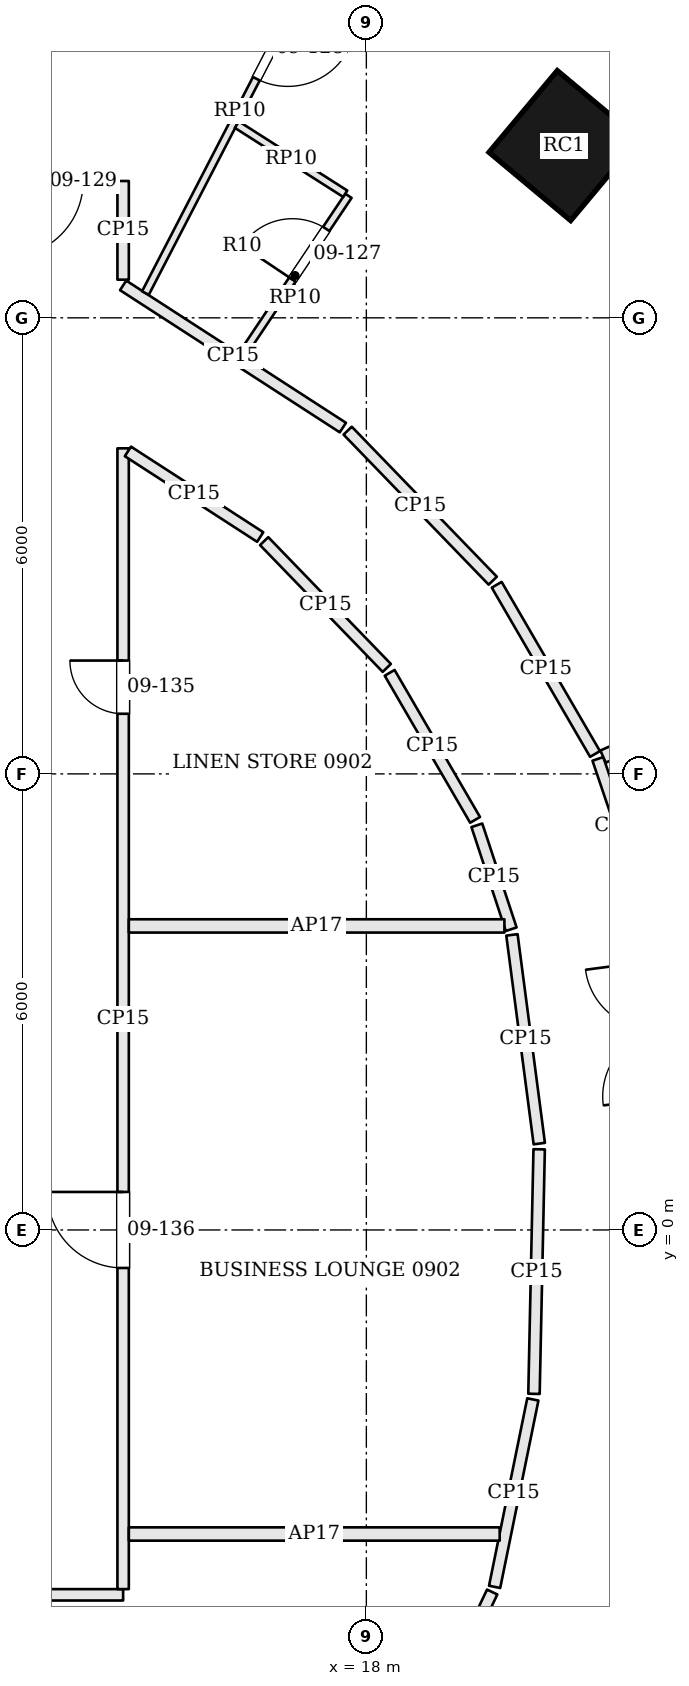
"""IFC4 building model, lengths in metres.
Left out: names, types, materials, properties, quantities, classifications, styles, units other than length and angle.
Written with IfcOpenShell. Run it as: python <this file> out.ifc"""

import sys

from ifc_helpers import new_model, si_unit, direction, frame, frame_2d, origin, origin_2d, place, context, subcontext, project, spatial, rectangle, extrude, element, fill, save


model = new_model("IFC4")
c1 = context("Model", 3, precision=1e-05, world=origin(), true_north=direction((0.0, 1.0)))
c2 = subcontext(c1, "Body", "Model", "MODEL_VIEW")
j1 = project(units=[si_unit("LENGTHUNIT", "METRE"), si_unit("PLANEANGLEUNIT", "RADIAN")], contexts=[c1])
p1 = place(None, origin())
s1 = spatial("IfcSite", under=j1, at=p1, CompositionType="ELEMENT")
p2 = place(p1, origin())
s2 = spatial("IfcBuilding", under=s1, at=p2, CompositionType="ELEMENT")
p3 = place(p2, frame((0.0, 0.0, 48.3)))
s3 = spatial("IfcBuildingStorey", under=s2, at=p3, CompositionType="ELEMENT", Elevation=48.3)
p4 = place(p3, frame((20.6, 14.266, 0.0), z_axis=(0.0, 0.0, 1.0), x_axis=(-0.767209547574, 0.641396531104, 0.0)))
e1 = element("IfcColumn", 1, at=p4, inside=s3, PredefinedType="COLUMN", context=c2, shape_type="SweptSolid", body=[
    extrude(rectangle(XDim=1.4, YDim=1.4, at=origin_2d()), origin(), (0.0, 0.0, 1.0), 3.6),
])
p5 = place(p3, frame((14.014, 19.447, 0.0), z_axis=(0.0, 0.0, 1.0), x_axis=(-0.318853578383, -0.947803985828, 0.0)))
e2 = element("IfcWall", 2, at=p5, inside=s3, PredefinedType="PARTITIONING", context=c2, shape_type="SweptSolid", body=[
    extrude(rectangle(XDim=5.883, YDim=0.175, at=frame_2d((2.941, 0.0))), origin(), (0.0, 0.0, 1.0), 2.68),
])
p6 = place(p3, frame((21.644, 4.43, 0.0), z_axis=(0.0, 0.0, 1.0), x_axis=(-0.320738869387, 0.9471676608, 0.0)))
e3 = element("IfcWall", 3, at=p6, inside=s3, PredefinedType="PARTITIONING", context=c2, shape_type="SweptSolid", body=[
    extrude(rectangle(XDim=1.866, YDim=0.15, at=frame_2d((0.933, 0.0))), origin(), (0.0, 0.0, 1.0), 2.68),
])
p7 = place(p3, frame((28.213, 9.371, 0.0), z_axis=(0.0, 0.0, 1.0), x_axis=(-0.914345064768, -0.404935923986, 0.0)))
e4 = element("IfcWall", 4, at=p7, inside=s3, PredefinedType="PARTITIONING", context=c2, shape_type="SweptSolid", body=[
    extrude(rectangle(XDim=7.763, YDim=0.175, at=frame_2d((3.882, 0.0))), origin(), (0.0, 0.0, 1.0), 2.68),
])
p8 = place(p3, frame((21.008, 6.262, 0.0), z_axis=(0.0, 0.0, 1.0), x_axis=(-0.502366583903, 0.864654737671, 0.0)))
e5 = element("IfcWall", 5, at=p8, inside=s3, PredefinedType="PARTITIONING", context=c2, shape_type="SweptSolid", body=[
    extrude(rectangle(XDim=2.574, YDim=0.15, at=frame_2d((1.287, 0.0))), origin(), (0.0, 0.0, 1.0), 2.68),
])
p9 = place(p3, frame((19.663, 8.542, 0.0), z_axis=(0.0, 0.0, 1.0), x_axis=(-0.695225869021, 0.718791340407, 0.0)))
e6 = element("IfcWall", 6, at=p9, inside=s3, PredefinedType="PARTITIONING", context=c2, shape_type="SweptSolid", body=[
    extrude(rectangle(XDim=2.745, YDim=0.15, at=frame_2d((1.373, 0.0))), origin(), (0.0, 0.0, 1.0), 2.68),
])
p10 = place(p3, frame((17.691, 10.556, 0.0), z_axis=(0.0, 0.0, 1.0), x_axis=(-0.839564450265, 0.54326009779, 0.0)))
e7 = element("IfcWall", 7, at=p10, inside=s3, PredefinedType="PARTITIONING", context=c2, shape_type="SweptSolid", body=[
    extrude(rectangle(XDim=3.443, YDim=0.15, at=frame_2d((1.722, 0.0))), origin(), (0.0, 0.0, 1.0), 2.68),
])
p11 = place(p3, frame((14.8, 12.502, 0.0), z_axis=(0.0, 0.0, 1.0), x_axis=(-0.000188040613, 0.99999998232, 0.0)))
e8 = element("IfcWall", 8, at=p11, inside=s3, PredefinedType="PARTITIONING", context=c2, shape_type="SweptSolid", body=[
    extrude(rectangle(XDim=1.298, YDim=0.15, at=frame_2d((0.649, 0.0))), origin(), (0.0, 0.0, 1.0), 2.68),
])
p12 = place(p3, frame((14.725, 13.8, 0.0), z_axis=(0.0, 0.0, 1.0), x_axis=(-1.0, 0.0, 0.0)))
e9 = element("IfcWall", 9, at=p12, inside=s3, PredefinedType="PARTITIONING", context=c2, shape_type="SweptSolid", body=[
    extrude(rectangle(XDim=2.535, YDim=0.15, at=frame_2d((1.268, 0.0))), origin(), (0.0, 0.0, 1.0), 2.68),
])
p13 = place(p12, frame((0.45, 0.0, 0.0)))
e10 = element("IfcOpeningElement", 10, at=p13, cuts=e9, PredefinedType="OPENING", context=c2, shape_type="SweptSolid", body=[
    extrude(rectangle(XDim=1.0, YDim=2.1, at=frame_2d((0.5, 1.05))), frame((0.0, 0.085, 0.0), z_axis=(0.0, -1.0, 0.0), x_axis=(1.0, 0.0, 0.0)), (0.0, 0.0, 1.0), 0.17),
])
p14 = place(p3, frame((-14.725, -4.8, 0.0), z_axis=(0.0, 0.0, 1.0), x_axis=(1.0, 0.0, 0.0)))
e11 = element("IfcWall", 11, at=p14, inside=s3, PredefinedType="PARTITIONING", context=c2, shape_type="SweptSolid", body=[
    extrude(rectangle(XDim=29.525, YDim=0.15, at=frame_2d((14.763, 0.0))), origin(), (0.0, 0.0, 1.0), 2.68),
])
p15 = place(p14, frame((2.075, 0.0, 0.0)))
e12 = element("IfcOpeningElement", 12, at=p15, cuts=e11, PredefinedType="OPENING", context=c2, shape_type="SweptSolid", body=[
    extrude(rectangle(XDim=1.0, YDim=2.4, at=frame_2d((0.5, 1.2))), frame((0.0, 0.085, 0.0), z_axis=(0.0, -1.0, 0.0), x_axis=(1.0, 0.0, 0.0)), (0.0, 0.0, 1.0), 0.17),
])
p16 = place(p14, frame((13.825, 0.0, 0.0)))
e13 = element("IfcOpeningElement", 13, at=p16, cuts=e11, PredefinedType="OPENING", context=c2, shape_type="SweptSolid", body=[
    extrude(rectangle(XDim=1.8, YDim=2.1, at=frame_2d((0.9, 1.05))), frame((0.0, 0.085, 0.0), z_axis=(0.0, -1.0, 0.0), x_axis=(1.0, 0.0, 0.0)), (0.0, 0.0, 1.0), 0.17),
])
p17 = place(p14, frame((26.375, 0.0, 0.0)))
e14 = element("IfcOpeningElement", 14, at=p17, cuts=e11, PredefinedType="OPENING", context=c2, shape_type="SweptSolid", body=[
    extrude(rectangle(XDim=1.0, YDim=2.4, at=frame_2d((0.5, 1.2))), frame((0.0, 0.085, 0.0), z_axis=(0.0, -1.0, 0.0), x_axis=(1.0, 0.0, 0.0)), (0.0, 0.0, 1.0), 0.17),
])
p18 = place(p3, frame((14.8, -4.725, 0.0), z_axis=(0.0, 0.0, 1.0), x_axis=(0.0, 1.0, 0.0)))
e15 = element("IfcWall", 15, at=p18, inside=s3, PredefinedType="PARTITIONING", context=c2, shape_type="SweptSolid", body=[
    extrude(rectangle(XDim=15.008, YDim=0.15, at=frame_2d((7.504, 0.0))), origin(), (0.0, 0.0, 1.0), 2.68),
])
p19 = place(p18, frame((11.516, 0.0, 0.0)))
e16 = element("IfcOpeningElement", 16, at=p19, cuts=e15, PredefinedType="OPENING", context=c2, shape_type="SweptSolid", body=[
    extrude(rectangle(XDim=0.7, YDim=2.1, at=frame_2d((0.35, 1.05))), frame((0.0, 0.085, 0.0), z_axis=(0.0, -1.0, 0.0), x_axis=(1.0, 0.0, 0.0)), (0.0, 0.0, 1.0), 0.17),
])
p20 = place(p18, frame((4.225, 0.0, 0.0)))
e17 = element("IfcOpeningElement", 17, at=p20, cuts=e15, PredefinedType="OPENING", context=c2, shape_type="SweptSolid", body=[
    extrude(rectangle(XDim=1.0, YDim=2.1, at=frame_2d((0.5, 1.05))), frame((0.0, 0.085, 0.0), z_axis=(0.0, -1.0, 0.0), x_axis=(1.0, 0.0, 0.0)), (0.0, 0.0, 1.0), 0.17),
])
p21 = place(p3, frame((14.863, 10.242, 0.0), z_axis=(0.0, 0.0, 1.0), x_axis=(0.839563837869, -0.543261044198, 0.0)))
e18 = element("IfcWall", 18, at=p21, inside=s3, PredefinedType="PARTITIONING", context=c2, shape_type="SweptSolid", body=[
    extrude(rectangle(XDim=2.073, YDim=0.15, at=frame_2d((1.037, 0.0))), origin(), (0.0, 0.0, 1.0), 2.68),
])
p22 = place(p3, frame((16.656, 9.062, 0.0), z_axis=(0.0, 0.0, 1.0), x_axis=(0.695225115827, -0.718792068906, 0.0)))
e19 = element("IfcWall", 19, at=p22, inside=s3, PredefinedType="PARTITIONING", context=c2, shape_type="SweptSolid", body=[
    extrude(rectangle(XDim=2.321, YDim=0.15, at=frame_2d((1.16, 0.0))), origin(), (0.0, 0.0, 1.0), 2.68),
])
p23 = place(p3, frame((18.306, 7.329, 0.0), z_axis=(0.0, 0.0, 1.0), x_axis=(0.502425081691, -0.864620747662, 0.0)))
e20 = element("IfcWall", 20, at=p23, inside=s3, PredefinedType="PARTITIONING", context=c2, shape_type="SweptSolid", body=[
    extrude(rectangle(XDim=2.237, YDim=0.15, at=frame_2d((1.119, 0.0))), origin(), (0.0, 0.0, 1.0), 2.68),
])
p24 = place(p3, frame((19.454, 5.324, 0.0), z_axis=(0.0, 0.0, 1.0), x_axis=(0.313632756375, -0.949544361327, 0.0)))
e21 = element("IfcWall", 21, at=p24, inside=s3, PredefinedType="PARTITIONING", context=c2, shape_type="SweptSolid", body=[
    extrude(rectangle(XDim=1.44, YDim=0.15, at=frame_2d((0.72, 0.0))), origin(), (0.0, 0.0, 1.0), 2.68),
])
p25 = place(p3, frame((19.915, 3.882, 0.0), z_axis=(0.0, 0.0, 1.0), x_axis=(0.129945947446, -0.991521079323, 0.0)))
e22 = element("IfcWall", 22, at=p25, inside=s3, PredefinedType="PARTITIONING", context=c2, shape_type="SweptSolid", body=[
    extrude(rectangle(XDim=2.769, YDim=0.15, at=frame_2d((1.385, 0.0))), origin(), (0.0, 0.0, 1.0), 2.68),
])
p26 = place(p3, frame((20.273, 1.061, 0.0), z_axis=(0.0, 0.0, 1.0), x_axis=(-0.021166906337, -0.99977595594, 0.0)))
e23 = element("IfcWall", 23, at=p26, inside=s3, PredefinedType="PARTITIONING", context=c2, shape_type="SweptSolid", body=[
    extrude(rectangle(XDim=3.218, YDim=0.15, at=frame_2d((1.609, 0.0))), origin(), (0.0, 0.0, 1.0), 2.68),
])
p27 = place(p3, frame((20.19, -2.229, 0.0), z_axis=(0.0, 0.0, 1.0), x_axis=(-0.199752828647, -0.97984631828, 0.0)))
e24 = element("IfcWall", 24, at=p27, inside=s3, PredefinedType="PARTITIONING", context=c2, shape_type="SweptSolid", body=[
    extrude(rectangle(XDim=2.517, YDim=0.15, at=frame_2d((1.258, 0.0))), origin(), (0.0, 0.0, 1.0), 2.68),
])
p28 = place(p3, frame((19.655, -4.763, 0.0), z_axis=(0.0, 0.0, 1.0), x_axis=(-0.427972604023, -0.903791707312, 0.0)))
e25 = element("IfcWall", 25, at=p28, inside=s3, PredefinedType="PARTITIONING", context=c2, shape_type="SweptSolid", body=[
    extrude(rectangle(XDim=2.215, YDim=0.15, at=frame_2d((1.107, 0.0))), origin(), (0.0, 0.0, 1.0), 2.68),
])
p29 = place(p3, frame((17.575, 17.118, 0.0), z_axis=(0.0, 0.0, 1.0), x_axis=(-0.459763790059, -0.88804124755, 0.0)))
e26 = element("IfcWall", 26, at=p29, inside=s3, PredefinedType="PARTITIONING", context=c2, shape_type="SweptSolid", body=[
    extrude(rectangle(XDim=5.397, YDim=0.1, at=frame_2d((2.698, 0.0))), origin(), (0.0, 0.0, 1.0), 2.934),
])
p30 = place(p29, frame((1.322, 0.0, 0.0)))
e27 = element("IfcOpeningElement", 27, at=p30, cuts=e26, PredefinedType="OPENING", context=c2, shape_type="SweptSolid", body=[
    extrude(rectangle(XDim=0.9, YDim=2.4, at=frame_2d((0.45, 1.2))), frame((0.0, 0.06, 0.0), z_axis=(0.0, -1.0, 0.0), x_axis=(1.0, 0.0, 0.0)), (0.0, 0.0, 1.0), 0.12),
])
p31 = place(p3, frame((16.36, 11.507, 0.0), z_axis=(0.0, 0.0, 1.0), x_axis=(0.556060542822, 0.831141788576, 0.0)))
e28 = element("IfcWall", 28, at=p31, inside=s3, PredefinedType="PARTITIONING", context=c2, shape_type="SweptSolid", body=[
    extrude(rectangle(XDim=2.525, YDim=0.1, at=frame_2d((1.262, 0.0))), origin(), (0.0, 0.0, 1.0), 2.934),
])
p32 = place(p31, frame((1.2, 0.0, 0.0)))
e29 = element("IfcOpeningElement", 29, at=p32, cuts=e28, PredefinedType="OPENING", context=c2, shape_type="SweptSolid", body=[
    extrude(rectangle(XDim=0.8, YDim=2.1, at=frame_2d((0.4, 1.05))), frame((0.0, 0.06, 0.0), z_axis=(0.0, -1.0, 0.0), x_axis=(1.0, 0.0, 0.0)), (0.0, 0.0, 1.0), 0.12),
])
p33 = place(p3, frame((17.722, 13.632, 0.0), z_axis=(0.0, 0.0, 1.0), x_axis=(-0.843078245163, 0.537790918977, 0.0)))
e30 = element("IfcWall", 30, at=p33, inside=s3, PredefinedType="PARTITIONING", context=c2, shape_type="SweptSolid", body=[
    extrude(rectangle(XDim=1.691, YDim=0.1, at=frame_2d((0.845, 0.0))), origin(), (0.0, 0.0, 1.0), 2.934),
])
p34 = place(p3, frame((14.875, 4.0, 0.0), z_axis=(0.0, 0.0, 1.0), x_axis=(1.0, 0.0, 0.0)))
e31 = element("IfcWall", 31, at=p34, inside=s3, PredefinedType="PARTITIONING", context=c2, shape_type="SweptSolid", body=[
    extrude(rectangle(XDim=4.941, YDim=0.175, at=frame_2d((2.471, 0.0))), origin(), (0.0, 0.0, 1.0), 2.68),
])
p35 = place(p3, frame((14.875, -4.0, 0.0), z_axis=(0.0, 0.0, 1.0), x_axis=(1.0, 0.0, 0.0)))
e32 = element("IfcWall", 32, at=p35, inside=s3, PredefinedType="PARTITIONING", context=c2, shape_type="SweptSolid", body=[
    extrude(rectangle(XDim=4.879, YDim=0.175, at=frame_2d((2.439, 0.0))), origin(), (0.0, 0.0, 1.0), 2.68),
])
p36 = place(p32, origin())
e33 = element("IfcDoor", 33, at=p36, inside=s3, OperationType="SINGLE_SWING_LEFT", PredefinedType="DOOR", context=c2, shape_type="SweptSolid", body=[
    extrude(rectangle(XDim=0.8, YDim=2.1, at=frame_2d((0.4, 1.05))), frame((0.0, 0.025, 0.0), z_axis=(0.0, -1.0, 0.0), x_axis=(1.0, 0.0, 0.0)), (0.0, 0.0, 1.0), 0.05),
])
fill(e29, e33)
p37 = place(p30, origin())
e34 = element("IfcDoor", 34, at=p37, inside=s3, OperationType="SINGLE_SWING_LEFT", PredefinedType="DOOR", context=c2, shape_type="SweptSolid", body=[
    extrude(rectangle(XDim=0.9, YDim=2.4, at=frame_2d((0.45, 1.2))), frame((0.0, 0.025, 0.0), z_axis=(0.0, -1.0, 0.0), x_axis=(1.0, 0.0, 0.0)), (0.0, 0.0, 1.0), 0.05),
])
fill(e27, e34)
p38 = place(p13, origin())
e35 = element("IfcDoor", 35, at=p38, inside=s3, OperationType="SINGLE_SWING_RIGHT", PredefinedType="DOOR", context=c2, shape_type="SweptSolid", body=[
    extrude(rectangle(XDim=1.0, YDim=2.1, at=frame_2d((0.5, 1.05))), frame((0.0, 0.025, 0.0), z_axis=(0.0, -1.0, 0.0), x_axis=(1.0, 0.0, 0.0)), (0.0, 0.0, 1.0), 0.05),
])
fill(e10, e35)
p39 = place(p19, origin())
e36 = element("IfcDoor", 36, at=p39, inside=s3, OperationType="SINGLE_SWING_RIGHT", PredefinedType="DOOR", context=c2, shape_type="SweptSolid", body=[
    extrude(rectangle(XDim=0.7, YDim=2.1, at=frame_2d((0.35, 1.05))), frame((0.0, 0.025, 0.0), z_axis=(0.0, -1.0, 0.0), x_axis=(1.0, 0.0, 0.0)), (0.0, 0.0, 1.0), 0.05),
])
fill(e16, e36)
p40 = place(p20, origin())
e37 = element("IfcDoor", 37, at=p40, inside=s3, OperationType="SINGLE_SWING_RIGHT", PredefinedType="DOOR", context=c2, shape_type="SweptSolid", body=[
    extrude(rectangle(XDim=1.0, YDim=2.1, at=frame_2d((0.5, 1.05))), frame((0.0, 0.025, 0.0), z_axis=(0.0, -1.0, 0.0), x_axis=(1.0, 0.0, 0.0)), (0.0, 0.0, 1.0), 0.05),
])
fill(e17, e37)
save(model, sys.argv[1])
